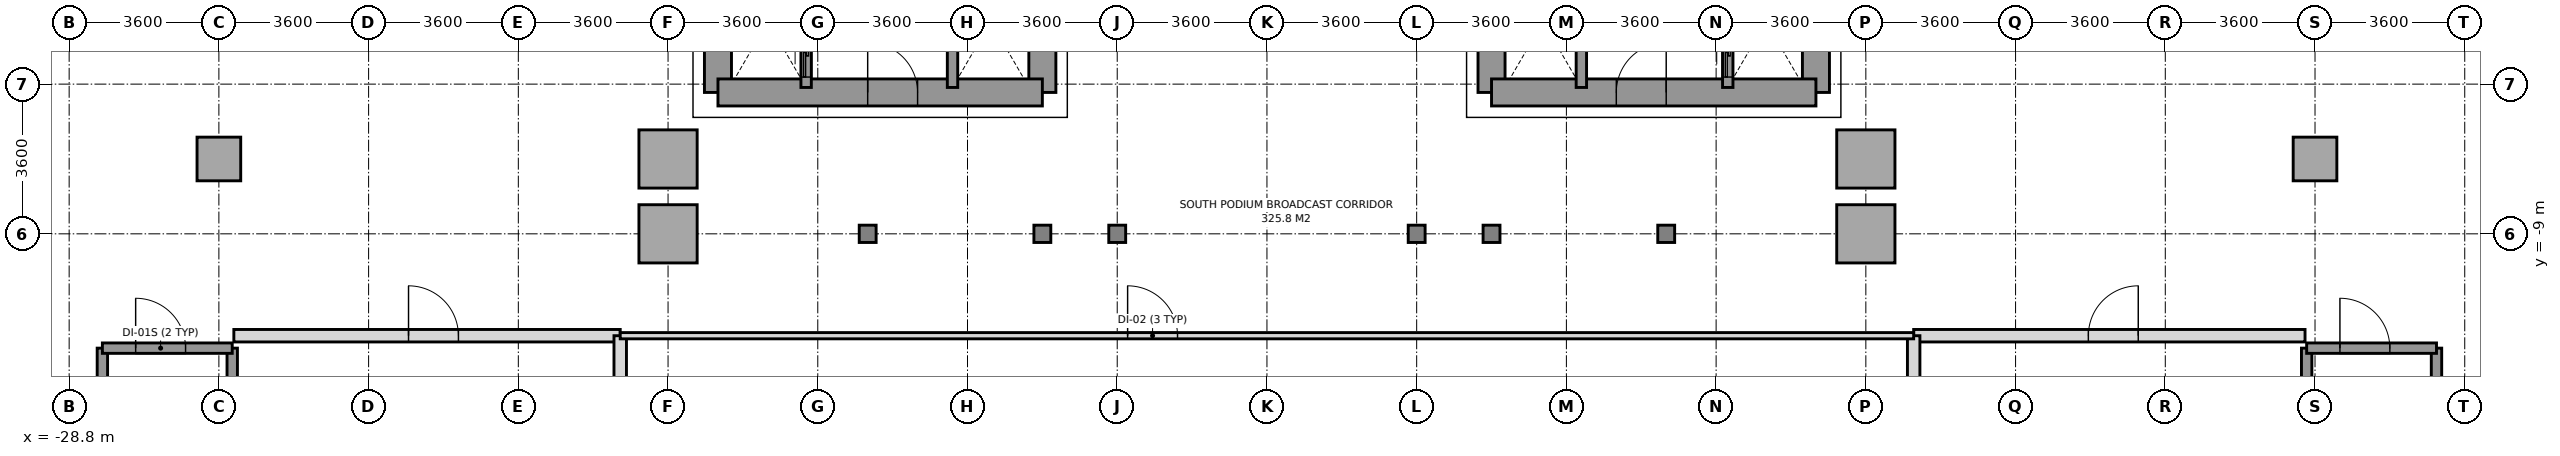
"""IFC4 building model, lengths in metres.
Left out: names, types, materials, properties, quantities, classifications, styles, units other than length and angle.
Written with IfcOpenShell. Run it as: python <this file> out.ifc"""

import sys

from ifc_helpers import new_model, si_unit, direction, frame, frame_2d, origin, origin_2d, place, context, subcontext, project, spatial, rectangle, i_section, extrude, source, transform, mapped, element, fill, save


model = new_model("IFC4")
c1 = context("Model", 3, precision=1e-05, world=origin(), true_north=direction((0.0, 1.0)))
c2 = subcontext(c1, "Body", "Model", "MODEL_VIEW")
j1 = project(units=[si_unit("LENGTHUNIT", "METRE"), si_unit("PLANEANGLEUNIT", "RADIAN")], contexts=[c1])
p1 = place(None, origin())
s1 = spatial("IfcSite", under=j1, at=p1, CompositionType="ELEMENT")
p2 = place(p1, origin())
s2 = spatial("IfcBuilding", under=s1, at=p2, CompositionType="ELEMENT")
p3 = place(p2, frame((0.0, 0.0, 5.4)))
s3 = spatial("IfcBuildingStorey", under=s2, at=p3, CompositionType="ELEMENT", Elevation=5.4)
m1 = source(origin(), c2, "Body", "SweptSolid", [
    extrude(rectangle(XDim=1.05, YDim=1.05, at=origin_2d()), origin(), (0.0, 0.0, 1.0), 4.52),
])
p4 = place(p3, frame((-25.2, -7.2, 0.0), z_axis=(0.0, 0.0, 1.0), x_axis=(1.0, 0.0, 0.0)))
e1 = element("IfcColumn", 1, at=p4, inside=s3, PredefinedType="COLUMN", context=c2, shape_type="MappedRepresentation", body=[
    mapped(m1, transform((0.0, 0.0, 0.0), x_axis=(1.0, 0.0, 0.0), y_axis=(0.0, 1.0, 0.0), z_axis=(0.0, 0.0, 1.0), scale=1.0)),
])
m2 = source(origin(), c2, "Body", "SweptSolid", [
    extrude(rectangle(XDim=1.4, YDim=1.4, at=origin_2d()), origin(), (0.0, 0.0, 1.0), 4.52),
])
for number, where, z_axis, x_axis in (
    (2, (-14.4, -9.0, 0.0), (0.0, 0.0, 1.0), (1.0, 0.0, 0.0)),
    (3, (-14.4, -7.2, 0.0), (0.0, 0.0, 1.0), (1.0, 0.0, 0.0)),
):
    element("IfcColumn", number, at=place(p3, frame(where, z_axis=z_axis, x_axis=x_axis)), inside=s3, PredefinedType="COLUMN", context=c2, shape_type="MappedRepresentation", body=[
        mapped(m2, transform((0.0, 0.0, 0.0), x_axis=(1.0, 0.0, 0.0), y_axis=(0.0, 1.0, 0.0), z_axis=(0.0, 0.0, 1.0), scale=1.0)),
    ])
m3 = source(origin(), c2, "Body", "SweptSolid", [
    extrude(i_section(OverallWidth=0.406, OverallDepth=0.416, WebThickness=0.024, FlangeThickness=0.039, at=origin_2d()), origin(), (0.0, 0.0, 1.0), 4.52),
])
for number, where, z_axis, x_axis in (
    (4, (-9.6, -9.0, 0.0), (0.0, 0.0, 1.0), (1.0, 0.0, 0.0)),
    (5, (-5.4, -9.0, 0.0), (0.0, 0.0, 1.0), (1.0, 0.0, 0.0)),
    (6, (-3.6, -9.0, 0.0), (0.0, 0.0, 1.0), (1.0, 0.0, 0.0)),
    (7, (3.6, -9.0, 0.0), (0.0, 0.0, 1.0), (1.0, 0.0, 0.0)),
    (8, (5.4, -9.0, 0.0), (0.0, 0.0, 1.0), (1.0, 0.0, 0.0)),
    (9, (9.6, -9.0, 0.0), (0.0, 0.0, 1.0), (1.0, 0.0, 0.0)),
):
    element("IfcColumn", number, at=place(p3, frame(where, z_axis=z_axis, x_axis=x_axis)), inside=s3, PredefinedType="COLUMN", context=c2, shape_type="MappedRepresentation", body=[
        mapped(m3, transform((0.0, 0.0, 0.0), x_axis=(1.0, 0.0, 0.0), y_axis=(0.0, 1.0, 0.0), z_axis=(0.0, 0.0, 1.0), scale=1.0)),
    ])
for number, where, z_axis, x_axis in (
    (10, (14.4, -9.0, 0.0), (0.0, 0.0, 1.0), (1.0, 0.0, 0.0)),
    (11, (14.4, -7.2, 0.0), (0.0, 0.0, 1.0), (1.0, 0.0, 0.0)),
):
    element("IfcColumn", number, at=place(p3, frame(where, z_axis=z_axis, x_axis=x_axis)), inside=s3, PredefinedType="COLUMN", context=c2, shape_type="MappedRepresentation", body=[
        mapped(m2, transform((0.0, 0.0, 0.0), x_axis=(1.0, 0.0, 0.0), y_axis=(0.0, 1.0, 0.0), z_axis=(0.0, 0.0, 1.0), scale=1.0)),
    ])
p5 = place(p3, frame((25.2, -7.2, 0.0), z_axis=(0.0, 0.0, 1.0), x_axis=(1.0, 0.0, 0.0)))
e12 = element("IfcColumn", 12, at=p5, inside=s3, PredefinedType="COLUMN", context=c2, shape_type="MappedRepresentation", body=[
    mapped(m1, transform((0.0, 0.0, 0.0), x_axis=(1.0, 0.0, 0.0), y_axis=(0.0, 1.0, 0.0), z_axis=(0.0, 0.0, 1.0), scale=1.0)),
])
p6 = place(p3, frame((-13.2, -5.6, 0.0), z_axis=(0.0, 0.0, 1.0), x_axis=(0.0, 1.0, 0.0)))
e13 = element("IfcWall", 13, at=p6, inside=s3, PredefinedType="SHEAR", context=c2, shape_type="SweptSolid", body=[
    extrude(rectangle(XDim=11.2, YDim=0.65, at=frame_2d((5.6, 0.0))), origin(), (0.0, 0.0, 1.0), 4.52),
])
p7 = place(p3, frame((-5.4, -5.6, 0.0), z_axis=(0.0, 0.0, 1.0), x_axis=(0.0, 1.0, 0.0)))
e14 = element("IfcWall", 14, at=p7, inside=s3, PredefinedType="SHEAR", context=c2, shape_type="SweptSolid", body=[
    extrude(rectangle(XDim=12.5, YDim=0.65, at=frame_2d((6.25, 0.0))), origin(), (0.0, 0.0, 1.0), 4.52),
])
p8 = place(p7, frame((4.55, 0.0, 0.0)))
e15 = element("IfcOpeningElement", 15, at=p8, cuts=e14, PredefinedType="OPENING", context=c2, shape_type="SweptSolid", body=[
    extrude(rectangle(XDim=1.2, YDim=2.2, at=frame_2d((0.6, 1.1))), frame((0.0, 0.335, 0.0), z_axis=(0.0, -1.0, 0.0), x_axis=(1.0, 0.0, 0.0)), (0.0, 0.0, 1.0), 0.67),
])
p9 = place(p3, frame((-13.2, -5.6, 0.0), z_axis=(0.0, 0.0, 1.0), x_axis=(1.0, 0.0, 0.0)))
e16 = element("IfcWall", 16, at=p9, inside=s3, PredefinedType="SHEAR", context=c2, shape_type="SweptSolid", body=[
    extrude(rectangle(XDim=7.8, YDim=0.65, at=frame_2d((3.9, 0.0))), origin(), (0.0, 0.0, 1.0), 4.52),
])
p10 = place(p9, frame((3.6, 0.0, 0.0)))
e17 = element("IfcOpeningElement", 17, at=p10, cuts=e16, PredefinedType="OPENING", context=c2, shape_type="SweptSolid", body=[
    extrude(rectangle(XDim=1.2, YDim=2.2, at=frame_2d((0.6, 1.1))), frame((0.0, 0.335, 0.0), z_axis=(0.0, -1.0, 0.0), x_axis=(1.0, 0.0, 0.0)), (0.0, 0.0, 1.0), 0.67),
])
p11 = place(p3, frame((13.2, -5.6, 0.0), z_axis=(0.0, 0.0, 1.0), x_axis=(0.0, 1.0, 0.0)))
e18 = element("IfcWall", 18, at=p11, inside=s3, PredefinedType="SHEAR", context=c2, shape_type="SweptSolid", body=[
    extrude(rectangle(XDim=11.2, YDim=0.65, at=frame_2d((5.6, 0.0))), origin(), (0.0, 0.0, 1.0), 4.52),
])
p12 = place(p3, frame((5.4, -5.6, 0.0), z_axis=(0.0, 0.0, 1.0), x_axis=(0.0, 1.0, 0.0)))
e19 = element("IfcWall", 19, at=p12, inside=s3, PredefinedType="SHEAR", context=c2, shape_type="SweptSolid", body=[
    extrude(rectangle(XDim=12.5, YDim=0.65, at=frame_2d((6.25, 0.0))), origin(), (0.0, 0.0, 1.0), 4.52),
])
p13 = place(p12, frame((4.55, 0.0, 0.0)))
e20 = element("IfcOpeningElement", 20, at=p13, cuts=e19, PredefinedType="OPENING", context=c2, shape_type="SweptSolid", body=[
    extrude(rectangle(XDim=1.2, YDim=2.2, at=frame_2d((0.6, 1.1))), frame((0.0, 0.335, 0.0), z_axis=(0.0, -1.0, 0.0), x_axis=(1.0, 0.0, 0.0)), (0.0, 0.0, 1.0), 0.67),
])
p14 = place(p12, frame((7.88, 0.0, 0.0)))
e21 = element("IfcOpeningElement", 21, at=p14, cuts=e19, PredefinedType="OPENING", context=c2, shape_type="SweptSolid", body=[
    extrude(rectangle(XDim=0.8, YDim=2.1, at=frame_2d((0.4, 1.05))), frame((0.0, 0.335, 0.0), z_axis=(0.0, -1.0, 0.0), x_axis=(1.0, 0.0, 0.0)), (0.0, 0.0, 1.0), 0.67),
])
p15 = place(p3, frame((5.4, -5.6, 0.0), z_axis=(0.0, 0.0, 1.0), x_axis=(1.0, 0.0, 0.0)))
e22 = element("IfcWall", 22, at=p15, inside=s3, PredefinedType="SHEAR", context=c2, shape_type="SweptSolid", body=[
    extrude(rectangle(XDim=7.8, YDim=0.65, at=frame_2d((3.9, 0.0))), origin(), (0.0, 0.0, 1.0), 4.52),
])
p16 = place(p15, frame((3.0, 0.0, 0.0)))
e23 = element("IfcOpeningElement", 23, at=p16, cuts=e22, PredefinedType="OPENING", context=c2, shape_type="SweptSolid", body=[
    extrude(rectangle(XDim=1.2, YDim=2.2, at=frame_2d((0.6, 1.1))), frame((0.0, 0.335, 0.0), z_axis=(0.0, -1.0, 0.0), x_axis=(1.0, 0.0, 0.0)), (0.0, 0.0, 1.0), 0.67),
])
for number, where, z_axis, x_axis in (
    (24, (-28.001, -18.671, 0.0), (0.0, 0.0, 1.0), (0.0, 1.0, 0.0)),
    (25, (-24.879, -18.671, 0.0), (0.0, 0.0, 1.0), (0.0, 1.0, 0.0)),
):
    element("IfcWall", number, at=place(p3, frame(where, z_axis=z_axis, x_axis=x_axis)), inside=s3, PredefinedType="SOLIDWALL", context=c2, shape_type="SweptSolid", body=[
        extrude(rectangle(XDim=6.922, YDim=0.25, at=frame_2d((3.461, 0.0))), origin(), (0.0, 0.0, 1.0), 4.52),
    ])
p17 = place(p3, frame((-28.001, -11.749, 0.0), z_axis=(0.0, 0.0, 1.0), x_axis=(1.0, 0.0, 0.0)))
e26 = element("IfcWall", 26, at=p17, inside=s3, PredefinedType="SOLIDWALL", context=c2, shape_type="SweptSolid", body=[
    extrude(rectangle(XDim=3.122, YDim=0.25, at=frame_2d((1.561, 0.0))), origin(), (0.0, 0.0, 1.0), 4.52),
])
p18 = place(p17, frame((0.8, 0.0, 0.0)))
e27 = element("IfcOpeningElement", 27, at=p18, cuts=e26, PredefinedType="OPENING", context=c2, shape_type="SweptSolid", body=[
    extrude(rectangle(XDim=1.2, YDim=2.2, at=frame_2d((0.6, 1.1))), frame((0.0, 0.135, 0.0), z_axis=(0.0, -1.0, 0.0), x_axis=(1.0, 0.0, 0.0)), (0.0, 0.0, 1.0), 0.27),
])
for number, where, z_axis, x_axis in (
    (28, (24.999, -18.671, 0.0), (0.0, 0.0, 1.0), (0.0, 1.0, 0.0)),
    (29, (28.121, -18.671, 0.0), (0.0, 0.0, 1.0), (0.0, 1.0, 0.0)),
):
    element("IfcWall", number, at=place(p3, frame(where, z_axis=z_axis, x_axis=x_axis)), inside=s3, PredefinedType="SOLIDWALL", context=c2, shape_type="SweptSolid", body=[
        extrude(rectangle(XDim=6.922, YDim=0.25, at=frame_2d((3.461, 0.0))), origin(), (0.0, 0.0, 1.0), 4.52),
    ])
p19 = place(p3, frame((24.999, -11.749, 0.0), z_axis=(0.0, 0.0, 1.0), x_axis=(1.0, 0.0, 0.0)))
e30 = element("IfcWall", 30, at=p19, inside=s3, PredefinedType="SOLIDWALL", context=c2, shape_type="SweptSolid", body=[
    extrude(rectangle(XDim=3.122, YDim=0.25, at=frame_2d((1.561, 0.0))), origin(), (0.0, 0.0, 1.0), 4.52),
])
p20 = place(p19, frame((0.8, 0.0, 0.0)))
e31 = element("IfcOpeningElement", 31, at=p20, cuts=e30, PredefinedType="OPENING", context=c2, shape_type="SweptSolid", body=[
    extrude(rectangle(XDim=1.2, YDim=2.2, at=frame_2d((0.6, 1.1))), frame((0.0, 0.135, 0.0), z_axis=(0.0, -1.0, 0.0), x_axis=(1.0, 0.0, 0.0)), (0.0, 0.0, 1.0), 0.27),
])
p21 = place(p3, frame((-11.08, -5.48, 0.0), z_axis=(0.0, 0.0, 1.0), x_axis=(0.0, 1.0, 0.0)))
e32 = element("IfcWall", 32, at=p21, inside=s3, PredefinedType="SOLIDWALL", context=c2, shape_type="SweptSolid", body=[
    extrude(rectangle(XDim=1.6, YDim=0.25, at=frame_2d((0.8, 0.0))), origin(), (0.0, 0.0, 1.0), 4.52),
])
p22 = place(p21, frame((0.25, 0.0, 0.0)))
e33 = element("IfcOpeningElement", 33, at=p22, cuts=e32, PredefinedType="OPENING", context=c2, shape_type="SweptSolid", body=[
    extrude(rectangle(XDim=1.1, YDim=2.2, at=frame_2d((0.55, 1.1))), frame((0.0, 0.135, 0.0), z_axis=(0.0, -1.0, 0.0), x_axis=(1.0, 0.0, 0.0)), (0.0, 0.0, 1.0), 0.27),
])
p23 = place(p3, frame((11.08, -5.48, 0.0), z_axis=(0.0, 0.0, 1.0), x_axis=(0.0, 1.0, 0.0)))
e34 = element("IfcWall", 34, at=p23, inside=s3, PredefinedType="SOLIDWALL", context=c2, shape_type="SweptSolid", body=[
    extrude(rectangle(XDim=1.6, YDim=0.25, at=frame_2d((0.8, 0.0))), origin(), (0.0, 0.0, 1.0), 4.52),
])
p24 = place(p23, frame((0.25, 0.0, 0.0)))
e35 = element("IfcOpeningElement", 35, at=p24, cuts=e34, PredefinedType="OPENING", context=c2, shape_type="SweptSolid", body=[
    extrude(rectangle(XDim=1.1, YDim=2.2, at=frame_2d((0.55, 1.1))), frame((0.0, 0.135, 0.0), z_axis=(0.0, -1.0, 0.0), x_axis=(1.0, 0.0, 0.0)), (0.0, 0.0, 1.0), 0.27),
])
for number, where, z_axis, x_axis in (
    (36, (-7.56, -5.48, 0.0), (0.0, 0.0, 1.0), (0.0, 1.0, 0.0)),
    (37, (7.56, -5.48, 0.0), (0.0, 0.0, 1.0), (0.0, 1.0, 0.0)),
):
    element("IfcWall", number, at=place(p3, frame(where, z_axis=z_axis, x_axis=x_axis)), inside=s3, PredefinedType="SOLIDWALL", context=c2, shape_type="SweptSolid", body=[
        extrude(rectangle(XDim=1.6, YDim=0.25, at=frame_2d((0.8, 0.0))), origin(), (0.0, 0.0, 1.0), 4.52),
    ])
p25 = place(p3, frame((-24.84, -11.45, 0.0), z_axis=(0.0, 0.0, 1.0), x_axis=(1.0, 0.0, 0.0)))
e38 = element("IfcWall", 38, at=p25, inside=s3, PredefinedType="SOLIDWALL", context=c2, shape_type="SweptSolid", body=[
    extrude(rectangle(XDim=9.29, YDim=0.3, at=frame_2d((4.645, 0.0))), origin(), (0.0, 0.0, 1.0), 4.52),
])
p26 = place(p25, frame((4.2, 0.0, 0.0)))
e39 = element("IfcOpeningElement", 39, at=p26, cuts=e38, PredefinedType="OPENING", context=c2, shape_type="SweptSolid", body=[
    extrude(rectangle(XDim=1.2, YDim=2.2, at=frame_2d((0.6, 1.1))), frame((0.0, 0.16, 0.0), z_axis=(0.0, -1.0, 0.0), x_axis=(1.0, 0.0, 0.0)), (0.0, 0.0, 1.0), 0.32),
])
p27 = place(p3, frame((-15.55, -19.45, 0.0), z_axis=(0.0, 0.0, 1.0), x_axis=(0.0, 1.0, 0.0)))
e40 = element("IfcWall", 40, at=p27, inside=s3, PredefinedType="SOLIDWALL", context=c2, shape_type="SweptSolid", body=[
    extrude(rectangle(XDim=8.0, YDim=0.3, at=frame_2d((4.0, 0.0))), origin(), (0.0, 0.0, 1.0), 3.77),
])
p28 = place(p3, frame((15.55, -11.45, 0.0), z_axis=(0.0, 0.0, 1.0), x_axis=(1.0, 0.0, 0.0)))
e41 = element("IfcWall", 41, at=p28, inside=s3, PredefinedType="SOLIDWALL", context=c2, shape_type="SweptSolid", body=[
    extrude(rectangle(XDim=9.41, YDim=0.3, at=frame_2d((4.705, 0.0))), origin(), (0.0, 0.0, 1.0), 4.52),
])
p29 = place(p28, frame((4.2, 0.0, 0.0)))
e42 = element("IfcOpeningElement", 42, at=p29, cuts=e41, PredefinedType="OPENING", context=c2, shape_type="SweptSolid", body=[
    extrude(rectangle(XDim=1.2, YDim=2.2, at=frame_2d((0.6, 1.1))), frame((0.0, 0.16, 0.0), z_axis=(0.0, -1.0, 0.0), x_axis=(1.0, 0.0, 0.0)), (0.0, 0.0, 1.0), 0.32),
])
p30 = place(p3, frame((15.55, -19.45, 0.0), z_axis=(0.0, 0.0, 1.0), x_axis=(0.0, 1.0, 0.0)))
e43 = element("IfcWall", 43, at=p30, inside=s3, PredefinedType="SOLIDWALL", context=c2, shape_type="SweptSolid", body=[
    extrude(rectangle(XDim=8.0, YDim=0.3, at=frame_2d((4.0, 0.0))), origin(), (0.0, 0.0, 1.0), 3.77),
])
p31 = place(p3, frame((-15.55, -11.45, 0.0), z_axis=(0.0, 0.0, 1.0), x_axis=(1.0, 0.0, 0.0)))
e44 = element("IfcWall", 44, at=p31, inside=s3, PredefinedType="PARTITIONING", context=c2, shape_type="SweptSolid", body=[
    extrude(rectangle(XDim=31.1, YDim=0.15, at=frame_2d((15.55, 0.0))), origin(), (0.0, 0.0, 1.0), 3.92),
])
p32 = place(p31, frame((12.2, 0.0, 0.0)))
e45 = element("IfcOpeningElement", 45, at=p32, cuts=e44, PredefinedType="OPENING", context=c2, shape_type="SweptSolid", body=[
    extrude(rectangle(XDim=1.2, YDim=2.2, at=frame_2d((0.6, 1.1))), frame((0.0, 0.085, 0.0), z_axis=(0.0, -1.0, 0.0), x_axis=(1.0, 0.0, 0.0)), (0.0, 0.0, 1.0), 0.17),
])
m4 = source(origin(), c2, "Body", "SweptSolid", [
    extrude(rectangle(XDim=1.2, YDim=2.2, at=frame_2d((0.6, 1.1))), frame((0.0, 0.025, 0.0), z_axis=(0.0, -1.0, 0.0), x_axis=(1.0, 0.0, 0.0)), (0.0, 0.0, 1.0), 0.05),
])
p33 = place(p10, origin())
e46 = element("IfcDoor", 46, at=p33, inside=s3, OperationType="SINGLE_SWING_LEFT", PredefinedType="DOOR", context=c2, shape_type="MappedRepresentation", body=[
    mapped(m4, transform((0.0, 0.0, 0.0), x_axis=(1.0, 0.0, 0.0), y_axis=(0.0, 1.0, 0.0), z_axis=(0.0, 0.0, 1.0), scale=1.0)),
])
fill(e17, e46)
p34 = place(p16, origin())
e47 = element("IfcDoor", 47, at=p34, inside=s3, OperationType="SINGLE_SWING_RIGHT", PredefinedType="DOOR", context=c2, shape_type="MappedRepresentation", body=[
    mapped(m4, transform((0.0, 0.0, 0.0), x_axis=(1.0, 0.0, 0.0), y_axis=(0.0, 1.0, 0.0), z_axis=(0.0, 0.0, 1.0), scale=1.0)),
])
fill(e23, e47)
p35 = place(p18, origin())
e48 = element("IfcDoor", 48, at=p35, inside=s3, OperationType="SINGLE_SWING_LEFT", PredefinedType="DOOR", context=c2, shape_type="MappedRepresentation", body=[
    mapped(m4, transform((0.0, 0.0, 0.0), x_axis=(1.0, 0.0, 0.0), y_axis=(0.0, 1.0, 0.0), z_axis=(0.0, 0.0, 1.0), scale=1.0)),
])
fill(e27, e48)
p36 = place(p20, origin())
e49 = element("IfcDoor", 49, at=p36, inside=s3, OperationType="SINGLE_SWING_LEFT", PredefinedType="DOOR", context=c2, shape_type="MappedRepresentation", body=[
    mapped(m4, transform((0.0, 0.0, 0.0), x_axis=(1.0, 0.0, 0.0), y_axis=(0.0, 1.0, 0.0), z_axis=(0.0, 0.0, 1.0), scale=1.0)),
])
fill(e31, e49)
m5 = source(origin(), c2, "Body", "SweptSolid", [
    extrude(rectangle(XDim=1.1, YDim=2.2, at=frame_2d((0.55, 1.1))), frame((0.0, 0.025, 0.0), z_axis=(0.0, -1.0, 0.0), x_axis=(1.0, 0.0, 0.0)), (0.0, 0.0, 1.0), 0.05),
])
p37 = place(p22, origin())
e50 = element("IfcDoor", 50, at=p37, inside=s3, OperationType="SLIDING_TO_LEFT", PredefinedType="DOOR", context=c2, shape_type="MappedRepresentation", body=[
    mapped(m5, transform((0.0, 0.0, 0.0), x_axis=(1.0, 0.0, 0.0), y_axis=(0.0, 1.0, 0.0), z_axis=(0.0, 0.0, 1.0), scale=1.0)),
])
fill(e33, e50)
p38 = place(p24, origin())
e51 = element("IfcDoor", 51, at=p38, inside=s3, OperationType="SLIDING_TO_LEFT", PredefinedType="DOOR", context=c2, shape_type="MappedRepresentation", body=[
    mapped(m5, transform((0.0, 0.0, 0.0), x_axis=(1.0, 0.0, 0.0), y_axis=(0.0, 1.0, 0.0), z_axis=(0.0, 0.0, 1.0), scale=1.0)),
])
fill(e35, e51)
p39 = place(p26, origin())
e52 = element("IfcDoor", 52, at=p39, inside=s3, OperationType="SINGLE_SWING_LEFT", PredefinedType="DOOR", context=c2, shape_type="MappedRepresentation", body=[
    mapped(m4, transform((0.0, 0.0, 0.0), x_axis=(1.0, 0.0, 0.0), y_axis=(0.0, 1.0, 0.0), z_axis=(0.0, 0.0, 1.0), scale=1.0)),
])
fill(e39, e52)
p40 = place(p29, origin())
e53 = element("IfcDoor", 53, at=p40, inside=s3, OperationType="SINGLE_SWING_RIGHT", PredefinedType="DOOR", context=c2, shape_type="MappedRepresentation", body=[
    mapped(m4, transform((0.0, 0.0, 0.0), x_axis=(1.0, 0.0, 0.0), y_axis=(0.0, 1.0, 0.0), z_axis=(0.0, 0.0, 1.0), scale=1.0)),
])
fill(e42, e53)
p41 = place(p32, origin())
e54 = element("IfcDoor", 54, at=p41, inside=s3, OperationType="SINGLE_SWING_LEFT", PredefinedType="DOOR", context=c2, shape_type="MappedRepresentation", body=[
    mapped(m4, transform((0.0, 0.0, 0.0), x_axis=(1.0, 0.0, 0.0), y_axis=(0.0, 1.0, 0.0), z_axis=(0.0, 0.0, 1.0), scale=1.0)),
])
fill(e45, e54)
save(model, sys.argv[1])
